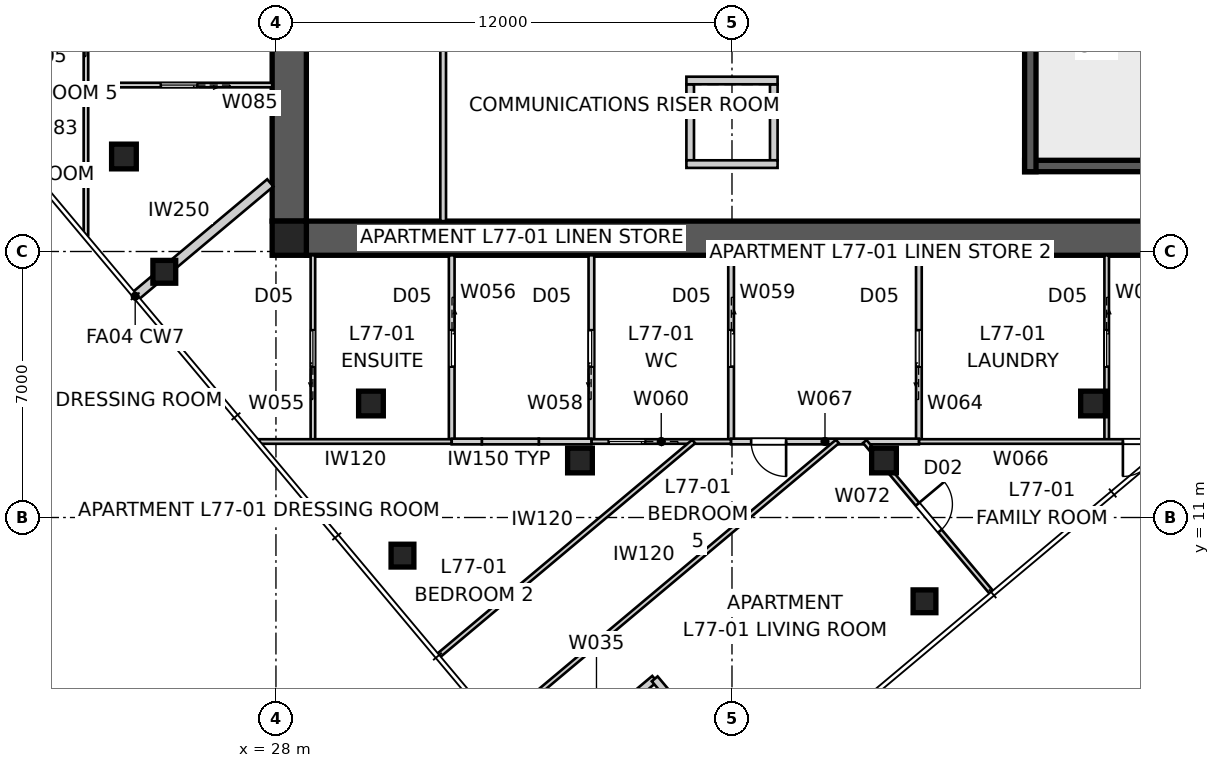
"""IFC4 building model, lengths in metres.
Left out: names, types, materials, properties, quantities, classifications, styles, units other than length and angle.
Written with IfcOpenShell. Run it as: python <this file> out.ifc"""

import sys

from ifc_helpers import new_model, si_unit, direction, frame, frame_2d, origin, origin_2d, place, context, subcontext, project, spatial, polyline, rectangle, outline, extrude, element, fill, save


model = new_model("IFC4")
c1 = context("Model", 3, precision=1e-05, world=origin(), true_north=direction((0.0, 1.0)))
c2 = subcontext(c1, "Body", "Model", "MODEL_VIEW")
j1 = project(units=[si_unit("LENGTHUNIT", "METRE"), si_unit("PLANEANGLEUNIT", "RADIAN")], contexts=[c1])
p1 = place(None, origin())
s1 = spatial("IfcSite", under=j1, at=p1, CompositionType="ELEMENT")
p2 = place(p1, origin())
s2 = spatial("IfcBuilding", under=s1, at=p2, CompositionType="ELEMENT")
p3 = place(p2, frame((0.0, 0.0, 279.4)))
s3 = spatial("IfcBuildingStorey", under=s2, at=p3, CompositionType="ELEMENT", Elevation=279.4)
p4 = place(p3, frame((51.2, 18.35, 0.0), z_axis=(0.0, 0.0, 1.0), x_axis=(-1.0, 0.0, 0.0)))
e1 = element("IfcWall", 1, at=p4, inside=s3, PredefinedType="SHEAR", context=c2, shape_type="SweptSolid", body=[
    extrude(outline(polyline([(0.0, -0.45), (22.4, -0.45), (22.4, -0.025), (22.85, -0.025), (22.85, 0.025), (22.4, 0.025), (22.4, 0.45), (0.0, 0.45), (0.0, 0.025), (-0.45, 0.025), (-0.45, -0.025), (0.0, -0.025), (0.0, -0.45)])), origin(), (0.0, 0.0, 1.0), 3.4),
])
p5 = place(p3, frame((28.35, 41.2, 0.0), z_axis=(0.0, 0.0, 1.0), x_axis=(0.0, -1.0, 0.0)))
e2 = element("IfcWall", 2, at=p5, inside=s3, PredefinedType="SHEAR", context=c2, shape_type="SweptSolid", body=[
    extrude(outline(polyline([(0.0, -0.45), (22.4, -0.45), (22.4, -0.025), (22.85, -0.025), (22.85, 0.025), (22.4, 0.025), (22.4, 0.45), (0.0, 0.45), (0.0, 0.025), (-0.45, 0.025), (-0.45, -0.025), (0.0, -0.025), (0.0, -0.45)])), origin(), (0.0, 0.0, 1.0), 3.4),
])
p6 = place(p5, frame((11.14, 0.0, 0.0)))
e3 = element("IfcOpeningElement", 3, at=p6, cuts=e2, PredefinedType="OPENING", context=c2, shape_type="SweptSolid", body=[
    extrude(rectangle(XDim=1.02, YDim=2.4, at=frame_2d((0.51, 1.2))), frame((0.0, 0.46, 0.0), z_axis=(0.0, -1.0, 0.0), x_axis=(1.0, 0.0, 0.0)), (0.0, 0.0, 1.0), 0.92),
])
p7 = place(p3, frame((47.85, 27.8, 0.0), z_axis=(0.0, 0.0, 1.0), x_axis=(0.0, -1.0, 0.0)))
e4 = element("IfcWall", 4, at=p7, inside=s3, PredefinedType="SHEAR", context=c2, shape_type="SweptSolid", body=[
    extrude(rectangle(XDim=7.7, YDim=0.3, at=frame_2d((3.85, 0.0))), origin(), (0.0, 0.0, 1.0), 3.4),
])
p8 = place(p3, frame((51.2, 20.25, 0.0), z_axis=(0.0, 0.0, 1.0), x_axis=(-1.0, 0.0, 0.0)))
e5 = element("IfcWall", 5, at=p8, inside=s3, PredefinedType="SHEAR", context=c2, shape_type="SweptSolid", body=[
    extrude(rectangle(XDim=3.5, YDim=0.3, at=frame_2d((1.75, 0.0))), origin(), (0.0, 0.0, 1.0), 3.4),
])
for number, where, z_axis, x_axis in (
    (6, (38.9, 22.4, 0.0), (0.0, 0.0, 1.0), (0.0, -1.0, 0.0)),
    (7, (41.1, 22.4, 0.0), (0.0, 0.0, 1.0), (0.0, -1.0, 0.0)),
):
    element("IfcWall", number, at=place(p3, frame(where, z_axis=z_axis, x_axis=x_axis)), inside=s3, PredefinedType="SOLIDWALL", context=c2, shape_type="SweptSolid", body=[
        extrude(rectangle(XDim=2.0, YDim=0.2, at=frame_2d((1.0, 0.0))), origin(), (0.0, 0.0, 1.0), 3.4),
    ])
for number, where, z_axis, x_axis in (
    (8, (38.8, 22.5, 0.0), (0.0, 0.0, 1.0), (1.0, 0.0, 0.0)),
    (9, (38.8, 20.3, 0.0), (0.0, 0.0, 1.0), (1.0, 0.0, 0.0)),
):
    element("IfcWall", number, at=place(p3, frame(where, z_axis=z_axis, x_axis=x_axis)), inside=s3, PredefinedType="SOLIDWALL", context=c2, shape_type="SweptSolid", body=[
        extrude(rectangle(XDim=2.4, YDim=0.2, at=frame_2d((1.2, 0.0))), origin(), (0.0, 0.0, 1.0), 3.4),
    ])
p9 = place(p3, frame((28.35, 18.35, 0.0), z_axis=(0.0, 0.0, 1.0), x_axis=(1.0, 0.0, 0.0)))
e10 = element("IfcColumn", 10, at=p9, inside=s3, PredefinedType="COLUMN", context=c2, shape_type="SweptSolid", body=[
    extrude(rectangle(XDim=0.9, YDim=0.9, at=origin_2d()), origin(), (0.0, 0.0, 1.0), 3.4),
])
for number, where, z_axis, x_axis in (
    (11, (45.065, 8.795, 0.0), (0.0, 0.0, 1.0), (1.0, 0.0, 0.0)),
    (12, (25.062, 17.466, 0.0), (0.0, 0.0, 1.0), (1.0, 0.0, 0.0)),
    (13, (31.329, 9.997, 0.0), (0.0, 0.0, 1.0), (1.0, 0.0, 0.0)),
):
    element("IfcColumn", number, at=place(p3, frame(where, z_axis=z_axis, x_axis=x_axis)), inside=s3, PredefinedType="COLUMN", context=c2, shape_type="SweptSolid", body=[
        extrude(rectangle(XDim=0.6, YDim=0.6, at=origin_2d()), origin(), (0.0, 0.0, 1.0), 3.4),
    ])
for number, where, z_axis, x_axis in (
    (14, (24.0, 20.5, 0.0), (0.0, 0.0, 1.0), (1.0, 0.0, 0.0)),
    (15, (30.5, 14.0, 0.0), (0.0, 0.0, 1.0), (1.0, 0.0, 0.0)),
    (16, (36.0, 12.5, 0.0), (0.0, 0.0, 1.0), (1.0, 0.0, 0.0)),
    (17, (44.0, 12.5, 0.0), (0.0, 0.0, 1.0), (1.0, 0.0, 0.0)),
    (18, (49.5, 14.0, 0.0), (0.0, 0.0, 1.0), (1.0, 0.0, 0.0)),
):
    element("IfcColumn", number, at=place(p3, frame(where, z_axis=z_axis, x_axis=x_axis)), inside=s3, PredefinedType="COLUMN", context=c2, shape_type="SweptSolid", body=[
        extrude(rectangle(XDim=0.65, YDim=0.65, at=origin_2d()), origin(), (0.0, 0.0, 1.0), 3.4),
    ])
p10 = place(p3, frame((34.902, 4.183, 0.0), z_axis=(0.0, 0.0, 1.0), x_axis=(0.766060656284, 0.642768287094, 0.0)))
e19 = element("IfcWall", 19, at=p10, inside=s3, PredefinedType="SOLIDWALL", context=c2, shape_type="SweptSolid", body=[
    extrude(rectangle(XDim=4.0, YDim=0.2, at=frame_2d((2.0, 0.0))), origin(), (0.0, 0.0, 1.0), 3.25),
])
p11 = place(p10, frame((0.8, 0.0, 0.0)))
e20 = element("IfcOpeningElement", 20, at=p11, cuts=e19, PredefinedType="OPENING", context=c2, shape_type="SweptSolid", body=[
    extrude(rectangle(XDim=2.4, YDim=2.4, at=frame_2d((1.2, 1.2))), frame((0.0, 0.11, 0.0), z_axis=(0.0, -1.0, 0.0), x_axis=(1.0, 0.0, 0.0)), (0.0, 0.0, 1.0), 0.22),
])
p12 = place(p3, frame((37.966, 6.754, 0.0), z_axis=(0.0, 0.0, 1.0), x_axis=(0.642798342015, -0.766035437498, 0.0)))
e21 = element("IfcWall", 21, at=p12, inside=s3, PredefinedType="SOLIDWALL", context=c2, shape_type="SweptSolid", body=[
    extrude(rectangle(XDim=4.0, YDim=0.2, at=frame_2d((2.0, 0.0))), origin(), (0.0, 0.0, 1.0), 3.25),
])
p13 = place(p12, frame((1.0, 0.0, 0.45)))
e22 = element("IfcOpeningElement", 22, at=p13, cuts=e21, PredefinedType="OPENING", context=c2, shape_type="SweptSolid", body=[
    extrude(rectangle(XDim=2.0, YDim=1.8, at=frame_2d((1.0, 0.9))), frame((0.0, 0.11, 0.0), z_axis=(0.0, -1.0, 0.0), x_axis=(1.0, 0.0, 0.0)), (0.0, 0.0, 1.0), 0.22),
])
p14 = place(p3, frame((24.296, 16.823, 0.0), z_axis=(0.0, 0.0, 1.0), x_axis=(0.76603440109, 0.64279957712, 0.0)))
e23 = element("IfcWall", 23, at=p14, inside=s3, PredefinedType="PARTITIONING", context=c2, shape_type="SweptSolid", body=[
    extrude(rectangle(XDim=4.64, YDim=0.25, at=frame_2d((2.32, 0.0))), origin(), (0.0, 0.0, 1.0), 3.25),
])
p15 = place(p3, frame((32.4, 18.8, 0.0), z_axis=(0.0, 0.0, 1.0), x_axis=(0.0, 1.0, 0.0)))
e24 = element("IfcWall", 24, at=p15, inside=s3, PredefinedType="SOLIDWALL", context=c2, shape_type="SweptSolid", body=[
    extrude(rectangle(XDim=5.9, YDim=0.15, at=frame_2d((2.95, 0.0))), origin(), (0.0, 0.0, 1.0), 3.25),
])
p16 = place(p3, frame((28.972, 13.0, 0.0), z_axis=(0.0, 0.0, 1.0), x_axis=(0.0, 1.0, 0.0)))
e25 = element("IfcWall", 25, at=p16, inside=s3, PredefinedType="PARTITIONING", context=c2, shape_type="SweptSolid", body=[
    extrude(rectangle(XDim=4.9, YDim=0.12, at=frame_2d((2.45, 0.0))), origin(), (0.0, 0.0, 1.0), 3.25),
])
p17 = place(p16, frame((1.97, 0.0, 0.0)))
e26 = element("IfcOpeningElement", 26, at=p17, cuts=e25, PredefinedType="OPENING", context=c2, shape_type="SweptSolid", body=[
    extrude(rectangle(XDim=0.96, YDim=2.1, at=frame_2d((0.48, 1.05))), frame((0.0, 0.07, 0.0), z_axis=(0.0, -1.0, 0.0), x_axis=(1.0, 0.0, 0.0)), (0.0, 0.0, 1.0), 0.14),
])
p18 = place(p3, frame((32.625, 17.9, 0.0), z_axis=(0.0, 0.0, 1.0), x_axis=(0.0, -1.0, 0.0)))
e27 = element("IfcWall", 27, at=p18, inside=s3, PredefinedType="SOLIDWALL", context=c2, shape_type="SweptSolid", body=[
    extrude(rectangle(XDim=4.9, YDim=0.15, at=frame_2d((2.45, 0.0))), origin(), (0.0, 0.0, 1.0), 3.25),
])
p19 = place(p18, frame((1.97, 0.0, 0.0)))
e28 = element("IfcOpeningElement", 28, at=p19, cuts=e27, PredefinedType="OPENING", context=c2, shape_type="SweptSolid", body=[
    extrude(rectangle(XDim=0.96, YDim=2.1, at=frame_2d((0.48, 1.05))), frame((0.0, 0.085, 0.0), z_axis=(0.0, -1.0, 0.0), x_axis=(1.0, 0.0, 0.0)), (0.0, 0.0, 1.0), 0.17),
])
p20 = place(p3, frame((32.625, 13.0, 0.0), z_axis=(0.0, 0.0, 1.0), x_axis=(-1.0, 0.0, 0.0)))
e29 = element("IfcWall", 29, at=p20, inside=s3, PredefinedType="PARTITIONING", context=c2, shape_type="SweptSolid", body=[
    extrude(rectangle(XDim=5.069, YDim=0.12, at=frame_2d((2.534, 0.0))), origin(), (0.0, 0.0, 1.0), 3.25),
])
p21 = place(p3, frame((36.301, 13.0, 0.0), z_axis=(0.0, 0.0, 1.0), x_axis=(0.0, 1.0, 0.0)))
e30 = element("IfcWall", 30, at=p21, inside=s3, PredefinedType="SOLIDWALL", context=c2, shape_type="SweptSolid", body=[
    extrude(rectangle(XDim=4.9, YDim=0.15, at=frame_2d((2.45, 0.0))), origin(), (0.0, 0.0, 1.0), 3.25),
])
p22 = place(p21, frame((1.97, 0.0, 0.0)))
e31 = element("IfcOpeningElement", 31, at=p22, cuts=e30, PredefinedType="OPENING", context=c2, shape_type="SweptSolid", body=[
    extrude(rectangle(XDim=0.96, YDim=2.1, at=frame_2d((0.48, 1.05))), frame((0.0, 0.085, 0.0), z_axis=(0.0, -1.0, 0.0), x_axis=(1.0, 0.0, 0.0)), (0.0, 0.0, 1.0), 0.17),
])
p23 = place(p3, frame((39.976, 17.9, 0.0), z_axis=(0.0, 0.0, 1.0), x_axis=(0.0, -1.0, 0.0)))
e32 = element("IfcWall", 32, at=p23, inside=s3, PredefinedType="SOLIDWALL", context=c2, shape_type="SweptSolid", body=[
    extrude(rectangle(XDim=4.9, YDim=0.15, at=frame_2d((2.45, 0.0))), origin(), (0.0, 0.0, 1.0), 2.796),
])
p24 = place(p23, frame((1.97, 0.0, 0.0)))
e33 = element("IfcOpeningElement", 33, at=p24, cuts=e32, PredefinedType="OPENING", context=c2, shape_type="SweptSolid", body=[
    extrude(rectangle(XDim=0.96, YDim=2.1, at=frame_2d((0.48, 1.05))), frame((0.0, 0.085, 0.0), z_axis=(0.0, -1.0, 0.0), x_axis=(1.0, 0.0, 0.0)), (0.0, 0.0, 1.0), 0.17),
])
p25 = place(p3, frame((39.976, 13.0, 0.0), z_axis=(0.0, 0.0, 1.0), x_axis=(-1.0, 0.0, 0.0)))
e34 = element("IfcWall", 34, at=p25, inside=s3, PredefinedType="PARTITIONING", context=c2, shape_type="SweptSolid", body=[
    extrude(rectangle(XDim=3.676, YDim=0.12, at=frame_2d((1.838, 0.0))), origin(), (0.0, 0.0, 1.0), 3.25),
])
p26 = place(p25, frame((2.261, 0.0, 0.0)))
e35 = element("IfcOpeningElement", 35, at=p26, cuts=e34, PredefinedType="OPENING", context=c2, shape_type="SweptSolid", body=[
    extrude(rectangle(XDim=0.96, YDim=2.1, at=frame_2d((0.48, 1.05))), frame((0.0, 0.07, 0.0), z_axis=(0.0, -1.0, 0.0), x_axis=(1.0, 0.0, 0.0)), (0.0, 0.0, 1.0), 0.14),
])
p27 = place(p3, frame((36.301, 13.0, 0.0), z_axis=(0.0, 0.0, 1.0), x_axis=(-1.0, 0.0, 0.0)))
e36 = element("IfcWall", 36, at=p27, inside=s3, PredefinedType="SOLIDWALL", context=c2, shape_type="SweptSolid", body=[
    extrude(rectangle(XDim=1.384, YDim=0.15, at=frame_2d((0.692, 0.0))), origin(), (0.0, 0.0, 1.0), 3.25),
])
p28 = place(p3, frame((34.917, 13.0, 0.0), z_axis=(0.0, 0.0, 1.0), x_axis=(-1.0, 0.0, 0.0)))
e37 = element("IfcWall", 37, at=p28, inside=s3, PredefinedType="SOLIDWALL", context=c2, shape_type="SweptSolid", body=[
    extrude(rectangle(XDim=1.5, YDim=0.15, at=frame_2d((0.75, 0.0))), origin(), (0.0, 0.0, 1.0), 2.55),
])
p29 = place(p3, frame((33.417, 13.0, 0.0), z_axis=(0.0, 0.0, 1.0), x_axis=(-1.0, 0.0, 0.0)))
e38 = element("IfcWall", 38, at=p29, inside=s3, PredefinedType="SOLIDWALL", context=c2, shape_type="SweptSolid", body=[
    extrude(rectangle(XDim=0.792, YDim=0.15, at=frame_2d((0.396, 0.0))), origin(), (0.0, 0.0, 1.0), 3.25),
])
p30 = place(p3, frame((44.918, 13.0, 0.0), z_axis=(0.0, 0.0, 1.0), x_axis=(0.0, 1.0, 0.0)))
e39 = element("IfcWall", 39, at=p30, inside=s3, PredefinedType="SOLIDWALL", context=c2, shape_type="SweptSolid", body=[
    extrude(rectangle(XDim=4.9, YDim=0.15, at=frame_2d((2.45, 0.0))), origin(), (0.0, 0.0, 1.0), 3.25),
])
p31 = place(p30, frame((1.97, 0.0, 0.0)))
e40 = element("IfcOpeningElement", 40, at=p31, cuts=e39, PredefinedType="OPENING", context=c2, shape_type="SweptSolid", body=[
    extrude(rectangle(XDim=0.96, YDim=2.1, at=frame_2d((0.48, 1.05))), frame((0.0, 0.085, 0.0), z_axis=(0.0, -1.0, 0.0), x_axis=(1.0, 0.0, 0.0)), (0.0, 0.0, 1.0), 0.17),
])
p32 = place(p3, frame((49.86, 17.9, 0.0), z_axis=(0.0, 0.0, 1.0), x_axis=(0.0, -1.0, 0.0)))
e41 = element("IfcWall", 41, at=p32, inside=s3, PredefinedType="PARTITIONING", context=c2, shape_type="SweptSolid", body=[
    extrude(rectangle(XDim=4.9, YDim=0.12, at=frame_2d((2.45, 0.0))), origin(), (0.0, 0.0, 1.0), 3.25),
])
p33 = place(p32, frame((1.97, 0.0, 0.0)))
e42 = element("IfcOpeningElement", 42, at=p33, cuts=e41, PredefinedType="OPENING", context=c2, shape_type="SweptSolid", body=[
    extrude(rectangle(XDim=0.96, YDim=2.1, at=frame_2d((0.48, 1.05))), frame((0.0, 0.07, 0.0), z_axis=(0.0, -1.0, 0.0), x_axis=(1.0, 0.0, 0.0)), (0.0, 0.0, 1.0), 0.14),
])
p34 = place(p3, frame((51.57, 13.0, 0.0), z_axis=(0.0, 0.0, 1.0), x_axis=(-1.0, 0.0, 0.0)))
e43 = element("IfcWall", 43, at=p34, inside=s3, PredefinedType="PARTITIONING", context=c2, shape_type="SweptSolid", body=[
    extrude(rectangle(XDim=6.652, YDim=0.12, at=frame_2d((3.326, 0.0))), origin(), (0.0, 0.0, 1.0), 2.55),
])
p35 = place(p34, frame((0.364, 0.0, 0.0)))
e44 = element("IfcOpeningElement", 44, at=p35, cuts=e43, PredefinedType="OPENING", context=c2, shape_type="SweptSolid", body=[
    extrude(rectangle(XDim=0.92, YDim=2.34, at=frame_2d((0.46, 1.17))), frame((0.0, 0.07, 0.0), z_axis=(0.0, -1.0, 0.0), x_axis=(1.0, 0.0, 0.0)), (0.0, 0.0, 1.0), 0.14),
])
p36 = place(p3, frame((44.918, 13.0, 0.0), z_axis=(0.0, 0.0, 1.0), x_axis=(-1.0, 0.0, 0.0)))
e45 = element("IfcWall", 45, at=p36, inside=s3, PredefinedType="SOLIDWALL", context=c2, shape_type="SweptSolid", body=[
    extrude(rectangle(XDim=4.942, YDim=0.15, at=frame_2d((2.471, 0.0))), origin(), (0.0, 0.0, 1.0), 3.25),
])
p37 = place(p36, frame((3.494, 0.0, 0.0)))
e46 = element("IfcOpeningElement", 46, at=p37, cuts=e45, PredefinedType="OPENING", context=c2, shape_type="SweptSolid", body=[
    extrude(rectangle(XDim=0.92, YDim=2.34, at=frame_2d((0.46, 1.17))), frame((0.0, 0.085, 0.0), z_axis=(0.0, -1.0, 0.0), x_axis=(1.0, 0.0, 0.0)), (0.0, 0.0, 1.0), 0.17),
])
p38 = place(p3, frame((33.844, 5.506, 0.0), z_axis=(0.0, 0.0, 1.0), x_axis=(0.766038517939, 0.642794670975, 0.0)))
e47 = element("IfcWall", 47, at=p38, inside=s3, PredefinedType="PARTITIONING", context=c2, shape_type="SweptSolid", body=[
    extrude(rectangle(XDim=11.658, YDim=0.12, at=frame_2d((5.829, 0.0))), origin(), (0.0, 0.0, 1.0), 3.25),
])
p39 = place(p3, frame((43.495, 13.0, 0.0), z_axis=(0.0, 0.0, 1.0), x_axis=(0.642776136034, -0.76605407051, 0.0)))
e48 = element("IfcWall", 48, at=p39, inside=s3, PredefinedType="PARTITIONING", context=c2, shape_type="SweptSolid", body=[
    extrude(rectangle(XDim=5.191, YDim=0.12, at=frame_2d((2.595, 0.0))), origin(), (0.0, 0.0, 1.0), 3.25),
])
p40 = place(p39, frame((2.155, 0.0, 0.0)))
e49 = element("IfcOpeningElement", 49, at=p40, cuts=e48, PredefinedType="OPENING", context=c2, shape_type="SweptSolid", body=[
    extrude(rectangle(XDim=0.92, YDim=2.34, at=frame_2d((0.46, 1.17))), frame((0.0, 0.07, 0.0), z_axis=(0.0, -1.0, 0.0), x_axis=(1.0, 0.0, 0.0)), (0.0, 0.0, 1.0), 0.14),
])
p41 = place(p3, frame((38.992, 13.0, 0.0), z_axis=(0.0, 0.0, 1.0), x_axis=(-0.766046785022, -0.642784818704, 0.0)))
e50 = element("IfcWall", 50, at=p41, inside=s3, PredefinedType="PARTITIONING", context=c2, shape_type="SweptSolid", body=[
    extrude(rectangle(XDim=8.76, YDim=0.12, at=frame_2d((4.38, 0.0))), origin(), (0.0, 0.0, 1.0), 3.25),
])
p42 = place(p3, frame((23.0, 18.43, 0.0), z_axis=(0.0, 0.0, 1.0), x_axis=(0.0, 1.0, 0.0)))
e51 = element("IfcWall", 51, at=p42, inside=s3, PredefinedType="PARTITIONING", context=c2, shape_type="SweptSolid", body=[
    extrude(rectangle(XDim=12.656, YDim=0.12, at=frame_2d((6.328, 0.0))), origin(), (0.0, 0.0, 1.0), 2.55),
])
p43 = place(p42, frame((10.521, 0.0, 0.0)))
e52 = element("IfcOpeningElement", 52, at=p43, cuts=e51, PredefinedType="OPENING", context=c2, shape_type="SweptSolid", body=[
    extrude(rectangle(XDim=0.92, YDim=2.34, at=frame_2d((0.46, 1.17))), frame((0.0, 0.07, 0.0), z_axis=(0.0, -1.0, 0.0), x_axis=(1.0, 0.0, 0.0)), (0.0, 0.0, 1.0), 0.14),
])
p44 = place(p42, frame((5.565, 0.0, 0.0)))
e53 = element("IfcOpeningElement", 53, at=p44, cuts=e51, PredefinedType="OPENING", context=c2, shape_type="SweptSolid", body=[
    extrude(rectangle(XDim=0.96, YDim=2.1, at=frame_2d((0.48, 1.05))), frame((0.0, 0.07, 0.0), z_axis=(0.0, -1.0, 0.0), x_axis=(1.0, 0.0, 0.0)), (0.0, 0.0, 1.0), 0.14),
])
p45 = place(p3, frame((27.9, 22.38, 0.0), z_axis=(0.0, 0.0, 1.0), x_axis=(-1.0, 0.0, 0.0)))
e54 = element("IfcWall", 54, at=p45, inside=s3, PredefinedType="PARTITIONING", context=c2, shape_type="SweptSolid", body=[
    extrude(rectangle(XDim=4.9, YDim=0.12, at=frame_2d((2.45, 0.0))), origin(), (0.0, 0.0, 1.0), 3.25),
])
p46 = place(p45, frame((1.97, 0.0, 0.0)))
e55 = element("IfcOpeningElement", 55, at=p46, cuts=e54, PredefinedType="OPENING", context=c2, shape_type="SweptSolid", body=[
    extrude(rectangle(XDim=0.96, YDim=2.1, at=frame_2d((0.48, 1.05))), frame((0.0, 0.07, 0.0), z_axis=(0.0, -1.0, 0.0), x_axis=(1.0, 0.0, 0.0)), (0.0, 0.0, 1.0), 0.14),
])
p47 = place(p3, frame((23.0, 26.505, 0.0), z_axis=(0.0, 0.0, 1.0), x_axis=(-0.76605407051, -0.642776136034, 0.0)))
e56 = element("IfcWall", 56, at=p47, inside=s3, PredefinedType="PARTITIONING", context=c2, shape_type="SweptSolid", body=[
    extrude(rectangle(XDim=5.191, YDim=0.12, at=frame_2d((2.595, 0.0))), origin(), (0.0, 0.0, 1.0), 3.25),
])
p48 = place(p46, origin())
e57 = element("IfcDoor", 57, at=p48, inside=s3, OperationType="SLIDING_TO_LEFT", PredefinedType="DOOR", context=c2, shape_type="SweptSolid", body=[
    extrude(rectangle(XDim=0.96, YDim=2.1, at=frame_2d((0.48, 1.05))), frame((0.0, 0.025, 0.0), z_axis=(0.0, -1.0, 0.0), x_axis=(1.0, 0.0, 0.0)), (0.0, 0.0, 1.0), 0.05),
])
fill(e55, e57)
p49 = place(p33, origin())
e58 = element("IfcDoor", 58, at=p49, inside=s3, OperationType="SLIDING_TO_LEFT", PredefinedType="DOOR", context=c2, shape_type="SweptSolid", body=[
    extrude(rectangle(XDim=0.96, YDim=2.1, at=frame_2d((0.48, 1.05))), frame((0.0, 0.025, 0.0), z_axis=(0.0, -1.0, 0.0), x_axis=(1.0, 0.0, 0.0)), (0.0, 0.0, 1.0), 0.05),
])
fill(e42, e58)
p50 = place(p35, origin())
e59 = element("IfcDoor", 59, at=p50, inside=s3, OperationType="SINGLE_SWING_RIGHT", PredefinedType="DOOR", context=c2, shape_type="SweptSolid", body=[
    extrude(rectangle(XDim=0.92, YDim=2.34, at=frame_2d((0.46, 1.17))), frame((0.0, 0.025, 0.0), z_axis=(0.0, -1.0, 0.0), x_axis=(1.0, 0.0, 0.0)), (0.0, 0.0, 1.0), 0.05),
])
fill(e44, e59)
p51 = place(p31, origin())
e60 = element("IfcDoor", 60, at=p51, inside=s3, OperationType="SLIDING_TO_LEFT", PredefinedType="DOOR", context=c2, shape_type="SweptSolid", body=[
    extrude(rectangle(XDim=0.96, YDim=2.1, at=frame_2d((0.48, 1.05))), frame((0.0, 0.025, 0.0), z_axis=(0.0, -1.0, 0.0), x_axis=(1.0, 0.0, 0.0)), (0.0, 0.0, 1.0), 0.05),
])
fill(e40, e60)
p52 = place(p40, origin())
e61 = element("IfcDoor", 61, at=p52, inside=s3, OperationType="SINGLE_SWING_LEFT", PredefinedType="DOOR", context=c2, shape_type="SweptSolid", body=[
    extrude(rectangle(XDim=0.92, YDim=2.34, at=frame_2d((0.46, 1.17))), frame((0.0, 0.025, 0.0), z_axis=(0.0, -1.0, 0.0), x_axis=(1.0, 0.0, 0.0)), (0.0, 0.0, 1.0), 0.05),
])
fill(e49, e61)
p53 = place(p24, origin())
e62 = element("IfcDoor", 62, at=p53, inside=s3, OperationType="SLIDING_TO_LEFT", PredefinedType="DOOR", context=c2, shape_type="SweptSolid", body=[
    extrude(rectangle(XDim=0.96, YDim=2.1, at=frame_2d((0.48, 1.05))), frame((0.0, 0.025, 0.0), z_axis=(0.0, -1.0, 0.0), x_axis=(1.0, 0.0, 0.0)), (0.0, 0.0, 1.0), 0.05),
])
fill(e33, e62)
p54 = place(p37, origin())
e63 = element("IfcDoor", 63, at=p54, inside=s3, OperationType="SINGLE_SWING_LEFT", PredefinedType="DOOR", context=c2, shape_type="SweptSolid", body=[
    extrude(rectangle(XDim=0.92, YDim=2.34, at=frame_2d((0.46, 1.17))), frame((0.0, 0.025, 0.0), z_axis=(0.0, -1.0, 0.0), x_axis=(1.0, 0.0, 0.0)), (0.0, 0.0, 1.0), 0.05),
])
fill(e46, e63)
p55 = place(p22, origin())
e64 = element("IfcDoor", 64, at=p55, inside=s3, OperationType="SLIDING_TO_LEFT", PredefinedType="DOOR", context=c2, shape_type="SweptSolid", body=[
    extrude(rectangle(XDim=0.96, YDim=2.1, at=frame_2d((0.48, 1.05))), frame((0.0, 0.025, 0.0), z_axis=(0.0, -1.0, 0.0), x_axis=(1.0, 0.0, 0.0)), (0.0, 0.0, 1.0), 0.05),
])
fill(e31, e64)
p56 = place(p26, origin())
e65 = element("IfcDoor", 65, at=p56, inside=s3, OperationType="SLIDING_TO_LEFT", PredefinedType="DOOR", context=c2, shape_type="SweptSolid", body=[
    extrude(rectangle(XDim=0.96, YDim=2.1, at=frame_2d((0.48, 1.05))), frame((0.0, 0.025, 0.0), z_axis=(0.0, -1.0, 0.0), x_axis=(1.0, 0.0, 0.0)), (0.0, 0.0, 1.0), 0.05),
])
fill(e35, e65)
p57 = place(p19, origin())
e66 = element("IfcDoor", 66, at=p57, inside=s3, OperationType="SLIDING_TO_LEFT", PredefinedType="DOOR", context=c2, shape_type="SweptSolid", body=[
    extrude(rectangle(XDim=0.96, YDim=2.1, at=frame_2d((0.48, 1.05))), frame((0.0, 0.025, 0.0), z_axis=(0.0, -1.0, 0.0), x_axis=(1.0, 0.0, 0.0)), (0.0, 0.0, 1.0), 0.05),
])
fill(e28, e66)
p58 = place(p17, origin())
e67 = element("IfcDoor", 67, at=p58, inside=s3, OperationType="SLIDING_TO_LEFT", PredefinedType="DOOR", context=c2, shape_type="SweptSolid", body=[
    extrude(rectangle(XDim=0.96, YDim=2.1, at=frame_2d((0.48, 1.05))), frame((0.0, 0.025, 0.0), z_axis=(0.0, -1.0, 0.0), x_axis=(1.0, 0.0, 0.0)), (0.0, 0.0, 1.0), 0.05),
])
fill(e26, e67)
save(model, sys.argv[1])
